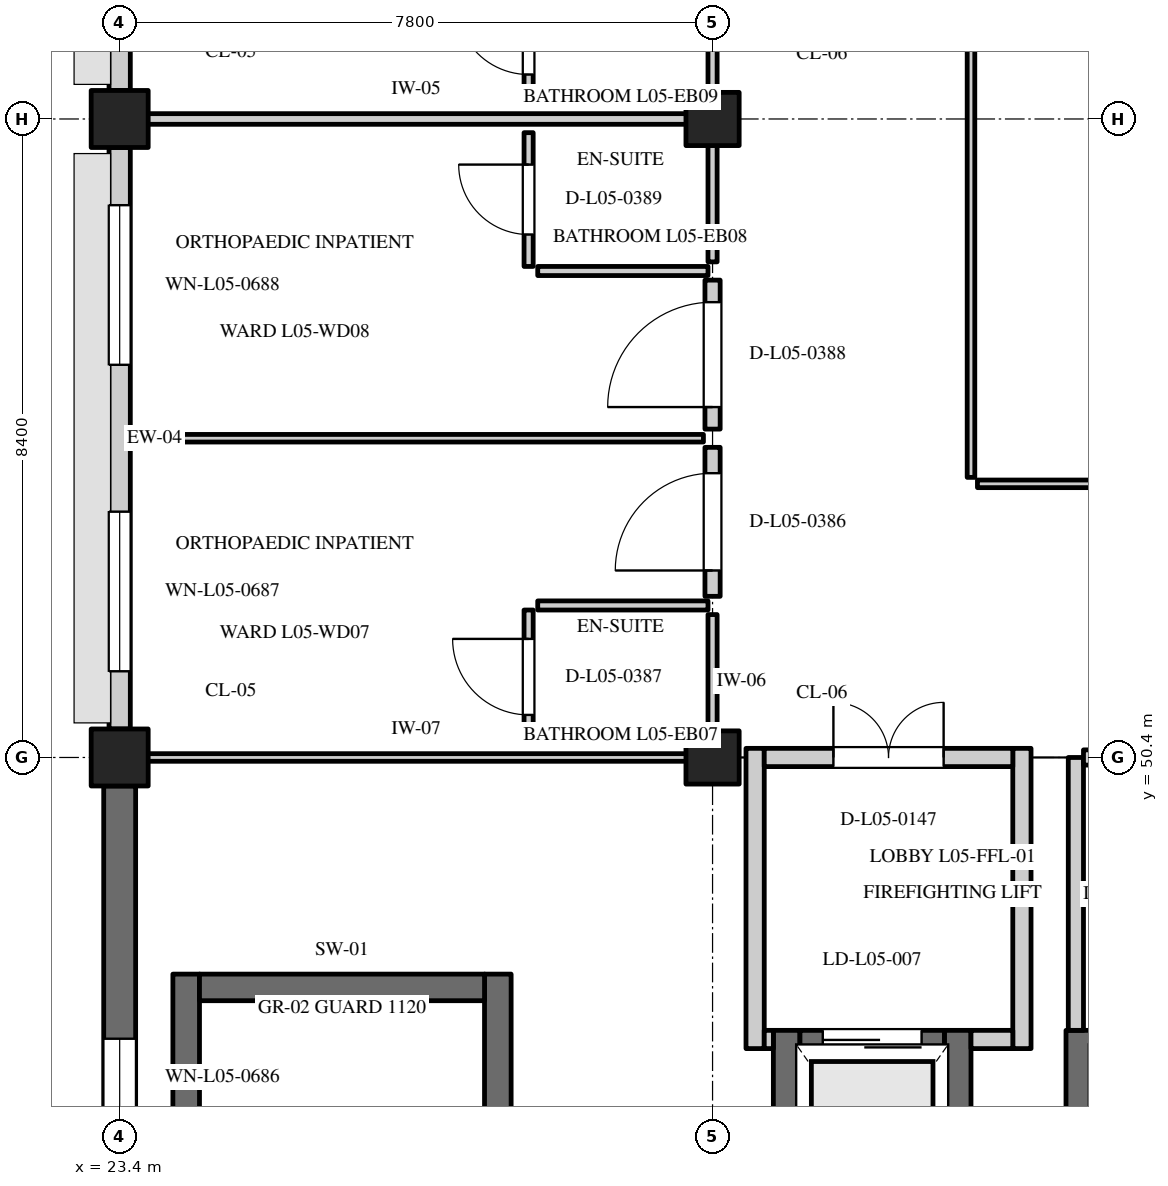
"""IFC4 building model, lengths in metres.
Left out: names, types, materials, properties, quantities, classifications, styles, units other than length and angle.
Written with IfcOpenShell. Run it as: python <this file> out.ifc"""

import sys

from ifc_helpers import new_model, si_unit, direction, frame, frame_2d, origin, origin_2d, place, context, subcontext, project, spatial, rectangle, extrude, element, fill, save


model = new_model("IFC4")
c1 = context("Model", 3, precision=1e-05, world=origin(), true_north=direction((0.0, 1.0)))
c2 = subcontext(c1, "Body", "Model", "MODEL_VIEW")
j1 = project(units=[si_unit("LENGTHUNIT", "METRE"), si_unit("PLANEANGLEUNIT", "RADIAN")], contexts=[c1])
p1 = place(None, origin())
s1 = spatial("IfcSite", under=j1, at=p1, CompositionType="ELEMENT")
p2 = place(p1, origin())
s2 = spatial("IfcBuilding", under=s1, at=p2, CompositionType="ELEMENT")
p3 = place(p2, frame((0.0, 0.0, 22.2)))
s3 = spatial("IfcBuildingStorey", under=s2, at=p3, CompositionType="ELEMENT", Elevation=22.2)
for number, where, z_axis, x_axis in (
    (1, (23.4, 50.4, 0.0), (0.0, 0.0, 1.0), (1.0, 0.0, 0.0)),
    (2, (23.4, 58.8, 0.0), (0.0, 0.0, 1.0), (1.0, 0.0, 0.0)),
):
    element("IfcColumn", number, at=place(p3, frame(where, z_axis=z_axis, x_axis=x_axis)), inside=s3, PredefinedType="COLUMN", context=c2, shape_type="SweptSolid", body=[
        extrude(rectangle(XDim=0.75, YDim=0.75, at=origin_2d()), origin(), (0.0, 0.0, 1.0), 3.9),
    ])
for number, where, z_axis, x_axis in (
    (3, (31.2, 50.4, 0.0), (0.0, 0.0, 1.0), (1.0, 0.0, 0.0)),
    (4, (31.2, 58.8, 0.0), (0.0, 0.0, 1.0), (1.0, 0.0, 0.0)),
):
    element("IfcColumn", number, at=place(p3, frame(where, z_axis=z_axis, x_axis=x_axis)), inside=s3, PredefinedType="COLUMN", context=c2, shape_type="SweptSolid", body=[
        extrude(rectangle(XDim=0.7, YDim=0.7, at=origin_2d()), origin(), (0.0, 0.0, 1.0), 3.9),
    ])
p4 = place(p3, frame((23.4, 42.375, 0.0), z_axis=(0.0, 0.0, 1.0), x_axis=(0.0, 1.0, 0.0)))
e5 = element("IfcWall", 5, at=p4, inside=s3, PredefinedType="SOLIDWALL", context=c2, shape_type="SweptSolid", body=[
    extrude(rectangle(XDim=7.65, YDim=0.42, at=frame_2d((3.825, 0.0))), origin(), (0.0, 0.0, 1.0), 2.95),
])
p5 = place(p4, frame((3.325, 0.0, 0.8)))
e6 = element("IfcOpeningElement", 6, at=p5, cuts=e5, PredefinedType="OPENING", context=c2, shape_type="SweptSolid", body=[
    extrude(rectangle(XDim=1.0, YDim=1.45, at=frame_2d((0.5, 0.725))), frame((0.0, 0.222, 0.0), z_axis=(0.0, -1.0, 0.0), x_axis=(1.0, 0.0, 0.0)), (0.0, 0.0, 1.0), 0.444),
])
p6 = place(p3, frame((23.4, 50.775, 0.0), z_axis=(0.0, 0.0, 1.0), x_axis=(0.0, 1.0, 0.0)))
e7 = element("IfcWall", 7, at=p6, inside=s3, PredefinedType="STANDARD", context=c2, shape_type="SweptSolid", body=[
    extrude(rectangle(XDim=7.65, YDim=0.28, at=frame_2d((3.825, 0.0))), origin(), (0.0, 0.0, 1.0), 2.95),
])
p7 = place(p6, frame((0.759, 0.0, 0.8)))
e8 = element("IfcOpeningElement", 8, at=p7, cuts=e7, PredefinedType="OPENING", context=c2, shape_type="SweptSolid", body=[
    extrude(rectangle(XDim=2.1, YDim=1.45, at=frame_2d((1.05, 0.725))), frame((0.0, 0.152, 0.0), z_axis=(0.0, -1.0, 0.0), x_axis=(1.0, 0.0, 0.0)), (0.0, 0.0, 1.0), 0.304),
])
p8 = place(p6, frame((4.791, 0.0, 0.8)))
e9 = element("IfcOpeningElement", 9, at=p8, cuts=e7, PredefinedType="OPENING", context=c2, shape_type="SweptSolid", body=[
    extrude(rectangle(XDim=2.1, YDim=1.45, at=frame_2d((1.05, 0.725))), frame((0.0, 0.152, 0.0), z_axis=(0.0, -1.0, 0.0), x_axis=(1.0, 0.0, 0.0)), (0.0, 0.0, 1.0), 0.304),
])
p9 = place(p3, frame((23.4, 59.175, 0.0), z_axis=(0.0, 0.0, 1.0), x_axis=(0.0, 1.0, 0.0)))
e10 = element("IfcWall", 10, at=p9, inside=s3, PredefinedType="STANDARD", context=c2, shape_type="SweptSolid", body=[
    extrude(rectangle(XDim=7.65, YDim=0.28, at=frame_2d((3.825, 0.0))), origin(), (0.0, 0.0, 1.0), 2.95),
])
p10 = place(p9, frame((0.809, 0.0, 0.8)))
e11 = element("IfcOpeningElement", 11, at=p10, cuts=e10, PredefinedType="OPENING", context=c2, shape_type="SweptSolid", body=[
    extrude(rectangle(XDim=2.0, YDim=1.75, at=frame_2d((1.0, 0.875))), frame((0.0, 0.152, 0.0), z_axis=(0.0, -1.0, 0.0), x_axis=(1.0, 0.0, 0.0)), (0.0, 0.0, 1.0), 0.304),
])
p11 = place(p9, frame((4.841, 0.0, 0.8)))
e12 = element("IfcOpeningElement", 12, at=p11, cuts=e10, PredefinedType="OPENING", context=c2, shape_type="SweptSolid", body=[
    extrude(rectangle(XDim=2.0, YDim=1.75, at=frame_2d((1.0, 0.875))), frame((0.0, 0.152, 0.0), z_axis=(0.0, -1.0, 0.0), x_axis=(1.0, 0.0, 0.0)), (0.0, 0.0, 1.0), 0.304),
])
for number, where, z_axis, x_axis in (
    (13, (24.275, 37.05, 0.0), (0.0, 0.0, 1.0), (0.0, 1.0, 0.0)),
    (14, (28.375, 37.05, 0.0), (0.0, 0.0, 1.0), (0.0, 1.0, 0.0)),
):
    element("IfcWall", number, at=place(p3, frame(where, z_axis=z_axis, x_axis=x_axis)), inside=s3, PredefinedType="SHEAR", context=c2, shape_type="SweptSolid", body=[
        extrude(rectangle(XDim=10.5, YDim=0.35, at=frame_2d((5.25, 0.0))), origin(), (0.0, 0.0, 1.0), 3.9),
    ])
for number, where, z_axis, x_axis in (
    (15, (24.45, 47.375, 0.0), (0.0, 0.0, 1.0), (1.0, 0.0, 0.0)),
    (16, (32.175, 43.06, 0.0), (0.0, 0.0, 1.0), (0.0, 1.0, 0.0)),
    (17, (34.425, 43.06, 0.0), (0.0, 0.0, 1.0), (0.0, 1.0, 0.0)),
):
    element("IfcWall", number, at=place(p3, frame(where, z_axis=z_axis, x_axis=x_axis)), inside=s3, PredefinedType="SHEAR", context=c2, shape_type="SweptSolid", body=[
        extrude(rectangle(XDim=3.75, YDim=0.35, at=frame_2d((1.875, 0.0))), origin(), (0.0, 0.0, 1.0), 3.9),
    ])
p12 = place(p3, frame((32.35, 46.635, 0.0), z_axis=(0.0, 0.0, 1.0), x_axis=(1.0, 0.0, 0.0)))
e18 = element("IfcWall", 18, at=p12, inside=s3, PredefinedType="SHEAR", context=c2, shape_type="SweptSolid", body=[
    extrude(rectangle(XDim=1.9, YDim=0.35, at=frame_2d((0.95, 0.0))), origin(), (0.0, 0.0, 1.0), 3.6),
])
p13 = place(p12, frame((0.3, 0.0, 0.0)))
e19 = element("IfcOpeningElement", 19, at=p13, cuts=e18, PredefinedType="OPENING", context=c2, shape_type="SweptSolid", body=[
    extrude(rectangle(XDim=1.3, YDim=2.2, at=frame_2d((0.65, 1.1))), frame((0.0, 0.187, 0.0), z_axis=(0.0, -1.0, 0.0), x_axis=(1.0, 0.0, 0.0)), (0.0, 0.0, 1.0), 0.374),
])
p14 = place(p3, frame((36.025, 43.36, 0.0), z_axis=(0.0, 0.0, 1.0), x_axis=(0.0, 1.0, 0.0)))
e20 = element("IfcWall", 20, at=p14, inside=s3, PredefinedType="SHEAR", context=c2, shape_type="SweptSolid", body=[
    extrude(rectangle(XDim=3.45, YDim=0.35, at=frame_2d((1.725, 0.0))), origin(), (0.0, 0.0, 1.0), 3.9),
])
for number, where, z_axis, x_axis in (
    (21, (31.76, 46.57, 0.0), (0.0, 0.0, 1.0), (0.0, 1.0, 0.0)),
    (22, (35.27, 46.57, 0.0), (0.0, 0.0, 1.0), (0.0, 1.0, 0.0)),
):
    element("IfcWall", number, at=place(p3, frame(where, z_axis=z_axis, x_axis=x_axis)), inside=s3, PredefinedType="STANDARD", context=c2, shape_type="SweptSolid", body=[
        extrude(rectangle(XDim=3.95, YDim=0.24, at=frame_2d((1.975, 0.0))), origin(), (0.0, 0.0, 1.0), 3.1),
    ])
p15 = place(p3, frame((31.88, 46.69, 0.0), z_axis=(0.0, 0.0, 1.0), x_axis=(1.0, 0.0, 0.0)))
e23 = element("IfcWall", 23, at=p15, inside=s3, PredefinedType="STANDARD", context=c2, shape_type="SweptSolid", body=[
    extrude(rectangle(XDim=0.12, YDim=0.24, at=frame_2d((0.06, 0.0))), origin(), (0.0, 0.0, 1.0), 3.1),
])
p16 = place(p3, frame((34.6, 46.69, 0.0), z_axis=(0.0, 0.0, 1.0), x_axis=(1.0, 0.0, 0.0)))
e24 = element("IfcWall", 24, at=p16, inside=s3, PredefinedType="STANDARD", context=c2, shape_type="SweptSolid", body=[
    extrude(rectangle(XDim=0.55, YDim=0.24, at=frame_2d((0.275, 0.0))), origin(), (0.0, 0.0, 1.0), 3.1),
])
p17 = place(p3, frame((31.88, 50.4, 0.0), z_axis=(0.0, 0.0, 1.0), x_axis=(1.0, 0.0, 0.0)))
e25 = element("IfcWall", 25, at=p17, inside=s3, PredefinedType="STANDARD", context=c2, shape_type="SweptSolid", body=[
    extrude(rectangle(XDim=3.27, YDim=0.24, at=frame_2d((1.635, 0.0))), origin(), (0.0, 0.0, 1.0), 3.1),
])
p18 = place(p17, frame((0.91, 0.0, 0.0)))
e26 = element("IfcOpeningElement", 26, at=p18, cuts=e25, PredefinedType="OPENING", context=c2, shape_type="SweptSolid", body=[
    extrude(rectangle(XDim=1.45, YDim=2.2, at=frame_2d((0.725, 1.1))), frame((0.0, 0.132, 0.0), z_axis=(0.0, -1.0, 0.0), x_axis=(1.0, 0.0, 0.0)), (0.0, 0.0, 1.0), 0.264),
])
p19 = place(p3, frame((35.98, 46.81, 0.0), z_axis=(0.0, 0.0, 1.0), x_axis=(0.0, 1.0, 0.0)))
e27 = element("IfcWall", 27, at=p19, inside=s3, PredefinedType="STANDARD", context=c2, shape_type="SweptSolid", body=[
    extrude(rectangle(XDim=3.59, YDim=0.2, at=frame_2d((1.795, 0.0))), origin(), (0.0, 0.0, 1.0), 3.1),
])
p20 = place(p3, frame((36.08, 50.4, 0.0), z_axis=(0.0, 0.0, 1.0), x_axis=(1.0, 0.0, 0.0)))
e28 = element("IfcWall", 28, at=p20, inside=s3, PredefinedType="STANDARD", context=c2, shape_type="SweptSolid", body=[
    extrude(rectangle(XDim=13.64, YDim=0.2, at=frame_2d((6.82, 0.0))), origin(), (0.0, 0.0, 1.0), 3.1),
])
p21 = place(p20, frame((5.995, 0.0, 0.0)))
e29 = element("IfcOpeningElement", 29, at=p21, cuts=e28, PredefinedType="OPENING", context=c2, shape_type="SweptSolid", body=[
    extrude(rectangle(XDim=1.65, YDim=2.25, at=frame_2d((0.825, 1.125))), frame((0.0, 0.112, 0.0), z_axis=(0.0, -1.0, 0.0), x_axis=(1.0, 0.0, 0.0)), (0.0, 0.0, 1.0), 0.224),
])
p22 = place(p3, frame((23.52, 50.4, 0.0), z_axis=(0.0, 0.0, 1.0), x_axis=(1.0, 0.0, 0.0)))
e30 = element("IfcWall", 30, at=p22, inside=s3, PredefinedType="PARTITIONING", context=c2, shape_type="SweptSolid", body=[
    extrude(rectangle(XDim=7.56, YDim=0.1, at=frame_2d((3.78, 0.0))), origin(), (0.0, 0.0, 1.0), 2.95),
])
p23 = place(p3, frame((23.52, 54.6, 0.0), z_axis=(0.0, 0.0, 1.0), x_axis=(1.0, 0.0, 0.0)))
e31 = element("IfcWall", 31, at=p23, inside=s3, PredefinedType="PARTITIONING", context=c2, shape_type="SweptSolid", body=[
    extrude(rectangle(XDim=7.56, YDim=0.1, at=frame_2d((3.78, 0.0))), origin(), (0.0, 0.0, 1.0), 3.58),
])
p24 = place(p3, frame((31.2, 52.52, 0.0), z_axis=(0.0, 0.0, 1.0), x_axis=(0.0, 1.0, 0.0)))
e32 = element("IfcWall", 32, at=p24, inside=s3, PredefinedType="STANDARD", context=c2, shape_type="SweptSolid", body=[
    extrude(rectangle(XDim=1.96, YDim=0.2, at=frame_2d((0.98, 0.0))), origin(), (0.0, 0.0, 1.0), 3.58),
])
p25 = place(p24, frame((0.34, 0.0, 0.0)))
e33 = element("IfcOpeningElement", 33, at=p25, cuts=e32, PredefinedType="OPENING", context=c2, shape_type="SweptSolid", body=[
    extrude(rectangle(XDim=1.28, YDim=2.15, at=frame_2d((0.64, 1.075))), frame((0.0, 0.112, 0.0), z_axis=(0.0, -1.0, 0.0), x_axis=(1.0, 0.0, 0.0)), (0.0, 0.0, 1.0), 0.224),
])
p26 = place(p3, frame((31.2, 50.52, 0.0), z_axis=(0.0, 0.0, 1.0), x_axis=(0.0, 1.0, 0.0)))
e34 = element("IfcWall", 34, at=p26, inside=s3, PredefinedType="PARTITIONING", context=c2, shape_type="SweptSolid", body=[
    extrude(rectangle(XDim=1.76, YDim=0.12, at=frame_2d((0.88, 0.0))), origin(), (0.0, 0.0, 1.0), 3.58),
])
p27 = place(p3, frame((28.9, 52.4, 0.0), z_axis=(0.0, 0.0, 1.0), x_axis=(1.0, 0.0, 0.0)))
e35 = element("IfcWall", 35, at=p27, inside=s3, PredefinedType="PARTITIONING", context=c2, shape_type="SweptSolid", body=[
    extrude(rectangle(XDim=2.24, YDim=0.12, at=frame_2d((1.12, 0.0))), origin(), (0.0, 0.0, 1.0), 3.58),
])
p28 = place(p3, frame((28.78, 50.58, 0.0), z_axis=(0.0, 0.0, 1.0), x_axis=(0.0, 1.0, 0.0)))
e36 = element("IfcWall", 36, at=p28, inside=s3, PredefinedType="PARTITIONING", context=c2, shape_type="SweptSolid", body=[
    extrude(rectangle(XDim=1.76, YDim=0.12, at=frame_2d((0.88, 0.0))), origin(), (0.0, 0.0, 1.0), 3.58),
])
p29 = place(p28, frame((0.38, 0.0, 0.0)))
e37 = element("IfcOpeningElement", 37, at=p29, cuts=e36, PredefinedType="OPENING", context=c2, shape_type="SweptSolid", body=[
    extrude(rectangle(XDim=1.0, YDim=2.1, at=frame_2d((0.5, 1.05))), frame((0.0, 0.072, 0.0), z_axis=(0.0, -1.0, 0.0), x_axis=(1.0, 0.0, 0.0)), (0.0, 0.0, 1.0), 0.144),
])
p30 = place(p3, frame((23.52, 58.8, 0.0), z_axis=(0.0, 0.0, 1.0), x_axis=(1.0, 0.0, 0.0)))
e38 = element("IfcWall", 38, at=p30, inside=s3, PredefinedType="PARTITIONING", context=c2, shape_type="SweptSolid", body=[
    extrude(rectangle(XDim=7.56, YDim=0.14, at=frame_2d((3.78, 0.0))), origin(), (0.0, 0.0, 1.0), 2.95),
])
p31 = place(p3, frame((31.2, 54.72, 0.0), z_axis=(0.0, 0.0, 1.0), x_axis=(0.0, 1.0, 0.0)))
e39 = element("IfcWall", 39, at=p31, inside=s3, PredefinedType="STANDARD", context=c2, shape_type="SweptSolid", body=[
    extrude(rectangle(XDim=1.96, YDim=0.2, at=frame_2d((0.98, 0.0))), origin(), (0.0, 0.0, 1.0), 3.58),
])
p32 = place(p31, frame((0.29, 0.0, 0.0)))
e40 = element("IfcOpeningElement", 40, at=p32, cuts=e39, PredefinedType="OPENING", context=c2, shape_type="SweptSolid", body=[
    extrude(rectangle(XDim=1.38, YDim=2.2, at=frame_2d((0.69, 1.1))), frame((0.0, 0.112, 0.0), z_axis=(0.0, -1.0, 0.0), x_axis=(1.0, 0.0, 0.0)), (0.0, 0.0, 1.0), 0.224),
])
p33 = place(p3, frame((31.2, 56.92, 0.0), z_axis=(0.0, 0.0, 1.0), x_axis=(0.0, 1.0, 0.0)))
e41 = element("IfcWall", 41, at=p33, inside=s3, PredefinedType="PARTITIONING", context=c2, shape_type="SweptSolid", body=[
    extrude(rectangle(XDim=1.76, YDim=0.12, at=frame_2d((0.88, 0.0))), origin(), (0.0, 0.0, 1.0), 3.58),
])
p34 = place(p3, frame((28.9, 56.8, 0.0), z_axis=(0.0, 0.0, 1.0), x_axis=(1.0, 0.0, 0.0)))
e42 = element("IfcWall", 42, at=p34, inside=s3, PredefinedType="PARTITIONING", context=c2, shape_type="SweptSolid", body=[
    extrude(rectangle(XDim=2.24, YDim=0.12, at=frame_2d((1.12, 0.0))), origin(), (0.0, 0.0, 1.0), 3.58),
])
p35 = place(p3, frame((28.78, 56.86, 0.0), z_axis=(0.0, 0.0, 1.0), x_axis=(0.0, 1.0, 0.0)))
e43 = element("IfcWall", 43, at=p35, inside=s3, PredefinedType="PARTITIONING", context=c2, shape_type="SweptSolid", body=[
    extrude(rectangle(XDim=1.76, YDim=0.12, at=frame_2d((0.88, 0.0))), origin(), (0.0, 0.0, 1.0), 3.58),
])
p36 = place(p35, frame((0.42, 0.0, 0.0)))
e44 = element("IfcOpeningElement", 44, at=p36, cuts=e43, PredefinedType="OPENING", context=c2, shape_type="SweptSolid", body=[
    extrude(rectangle(XDim=0.92, YDim=2.08, at=frame_2d((0.46, 1.04))), frame((0.0, 0.072, 0.0), z_axis=(0.0, -1.0, 0.0), x_axis=(1.0, 0.0, 0.0)), (0.0, 0.0, 1.0), 0.144),
])
p37 = place(p3, frame((31.2, 58.92, 0.0), z_axis=(0.0, 0.0, 1.0), x_axis=(0.0, 1.0, 0.0)))
e45 = element("IfcWall", 45, at=p37, inside=s3, PredefinedType="PARTITIONING", context=c2, shape_type="SweptSolid", body=[
    extrude(rectangle(XDim=1.76, YDim=0.12, at=frame_2d((0.88, 0.0))), origin(), (0.0, 0.0, 1.0), 3.58),
])
p38 = place(p3, frame((28.78, 58.98, 0.0), z_axis=(0.0, 0.0, 1.0), x_axis=(0.0, 1.0, 0.0)))
e46 = element("IfcWall", 46, at=p38, inside=s3, PredefinedType="PARTITIONING", context=c2, shape_type="SweptSolid", body=[
    extrude(rectangle(XDim=1.76, YDim=0.12, at=frame_2d((0.88, 0.0))), origin(), (0.0, 0.0, 1.0), 3.58),
])
p39 = place(p38, frame((0.405, 0.0, 0.0)))
e47 = element("IfcOpeningElement", 47, at=p39, cuts=e46, PredefinedType="OPENING", context=c2, shape_type="SweptSolid", body=[
    extrude(rectangle(XDim=0.95, YDim=2.1, at=frame_2d((0.475, 1.05))), frame((0.0, 0.072, 0.0), z_axis=(0.0, -1.0, 0.0), x_axis=(1.0, 0.0, 0.0)), (0.0, 0.0, 1.0), 0.144),
])
p40 = place(p3, frame((34.685, 54.0, 0.0), z_axis=(0.0, 0.0, 1.0), x_axis=(1.0, 0.0, 0.0)))
e48 = element("IfcWall", 48, at=p40, inside=s3, PredefinedType="PARTITIONING", context=c2, shape_type="SweptSolid", body=[
    extrude(rectangle(XDim=9.83, YDim=0.1, at=frame_2d((4.915, 0.0))), origin(), (0.0, 0.0, 1.0), 3.58),
])
p41 = place(p40, frame((2.267, 0.0, 0.0)))
e49 = element("IfcOpeningElement", 49, at=p41, cuts=e48, PredefinedType="OPENING", context=c2, shape_type="SweptSolid", body=[
    extrude(rectangle(XDim=1.6, YDim=2.25, at=frame_2d((0.8, 1.125))), frame((0.0, 0.062, 0.0), z_axis=(0.0, -1.0, 0.0), x_axis=(1.0, 0.0, 0.0)), (0.0, 0.0, 1.0), 0.124),
])
p42 = place(p3, frame((34.6, 54.085, 0.0), z_axis=(0.0, 0.0, 1.0), x_axis=(0.0, 1.0, 0.0)))
e50 = element("IfcWall", 50, at=p42, inside=s3, PredefinedType="PARTITIONING", context=c2, shape_type="SweptSolid", body=[
    extrude(rectangle(XDim=9.83, YDim=0.1, at=frame_2d((4.915, 0.0))), origin(), (0.0, 0.0, 1.0), 3.58),
])
p43 = place(p5, origin())
e51 = element("IfcWindow", 51, at=p43, inside=s3, PartitioningType="SINGLE_PANEL", PredefinedType="WINDOW", context=c2, shape_type="SweptSolid", body=[
    extrude(rectangle(XDim=1.0, YDim=1.45, at=frame_2d((0.5, 0.725))), frame((0.0, 0.03, 0.0), z_axis=(0.0, -1.0, 0.0), x_axis=(1.0, 0.0, 0.0)), (0.0, 0.0, 1.0), 0.06),
])
fill(e6, e51)
p44 = place(p7, origin())
e52 = element("IfcWindow", 52, at=p44, inside=s3, PartitioningType="DOUBLE_PANEL_VERTICAL", PredefinedType="WINDOW", context=c2, shape_type="SweptSolid", body=[
    extrude(rectangle(XDim=2.1, YDim=1.45, at=frame_2d((1.05, 0.725))), frame((0.0, 0.03, 0.0), z_axis=(0.0, -1.0, 0.0), x_axis=(1.0, 0.0, 0.0)), (0.0, 0.0, 1.0), 0.06),
])
fill(e8, e52)
p45 = place(p8, origin())
e53 = element("IfcWindow", 53, at=p45, inside=s3, PartitioningType="DOUBLE_PANEL_VERTICAL", PredefinedType="WINDOW", context=c2, shape_type="SweptSolid", body=[
    extrude(rectangle(XDim=2.1, YDim=1.45, at=frame_2d((1.05, 0.725))), frame((0.0, 0.03, 0.0), z_axis=(0.0, -1.0, 0.0), x_axis=(1.0, 0.0, 0.0)), (0.0, 0.0, 1.0), 0.06),
])
fill(e9, e53)
p46 = place(p13, origin())
e54 = element("IfcDoor", 54, at=p46, inside=s3, OperationType="SLIDING_TO_LEFT", PredefinedType="DOOR", context=c2, shape_type="SweptSolid", body=[
    extrude(rectangle(XDim=1.3, YDim=2.2, at=frame_2d((0.65, 1.1))), frame((0.0, 0.025, 0.0), z_axis=(0.0, -1.0, 0.0), x_axis=(1.0, 0.0, 0.0)), (0.0, 0.0, 1.0), 0.05),
])
fill(e19, e54)
p47 = place(p18, origin())
e55 = element("IfcDoor", 55, at=p47, inside=s3, OperationType="DOUBLE_DOOR_SINGLE_SWING", PredefinedType="DOOR", context=c2, shape_type="SweptSolid", body=[
    extrude(rectangle(XDim=1.45, YDim=2.2, at=frame_2d((0.725, 1.1))), frame((0.0, 0.025, 0.0), z_axis=(0.0, -1.0, 0.0), x_axis=(1.0, 0.0, 0.0)), (0.0, 0.0, 1.0), 0.05),
])
fill(e26, e55)
p48 = place(p25, origin())
e56 = element("IfcDoor", 56, at=p48, inside=s3, OperationType="SINGLE_SWING_LEFT", PredefinedType="DOOR", context=c2, shape_type="SweptSolid", body=[
    extrude(rectangle(XDim=1.28, YDim=2.15, at=frame_2d((0.64, 1.075))), frame((0.0, 0.025, 0.0), z_axis=(0.0, -1.0, 0.0), x_axis=(1.0, 0.0, 0.0)), (0.0, 0.0, 1.0), 0.05),
])
fill(e33, e56)
p49 = place(p29, frame((1.0, 0.0, 0.0), z_axis=(0.0, 0.0, 1.0), x_axis=(-1.0, 0.0, 0.0)))
e57 = element("IfcDoor", 57, at=p49, inside=s3, OperationType="SINGLE_SWING_LEFT", PredefinedType="DOOR", context=c2, shape_type="SweptSolid", body=[
    extrude(rectangle(XDim=1.0, YDim=2.1, at=frame_2d((0.5, 1.05))), frame((0.0, 0.025, 0.0), z_axis=(0.0, -1.0, 0.0), x_axis=(1.0, 0.0, 0.0)), (0.0, 0.0, 1.0), 0.05),
])
fill(e37, e57)
p50 = place(p32, origin())
e58 = element("IfcDoor", 58, at=p50, inside=s3, OperationType="SINGLE_SWING_LEFT", PredefinedType="DOOR", context=c2, shape_type="SweptSolid", body=[
    extrude(rectangle(XDim=1.38, YDim=2.2, at=frame_2d((0.69, 1.1))), frame((0.0, 0.025, 0.0), z_axis=(0.0, -1.0, 0.0), x_axis=(1.0, 0.0, 0.0)), (0.0, 0.0, 1.0), 0.05),
])
fill(e40, e58)
p51 = place(p36, frame((0.92, 0.0, 0.0), z_axis=(0.0, 0.0, 1.0), x_axis=(-1.0, 0.0, 0.0)))
e59 = element("IfcDoor", 59, at=p51, inside=s3, OperationType="SINGLE_SWING_LEFT", PredefinedType="DOOR", context=c2, shape_type="SweptSolid", body=[
    extrude(rectangle(XDim=0.92, YDim=2.08, at=frame_2d((0.46, 1.04))), frame((0.0, 0.025, 0.0), z_axis=(0.0, -1.0, 0.0), x_axis=(1.0, 0.0, 0.0)), (0.0, 0.0, 1.0), 0.05),
])
fill(e44, e59)
p52 = place(p39, frame((0.95, 0.0, 0.0), z_axis=(0.0, 0.0, 1.0), x_axis=(-1.0, 0.0, 0.0)))
e60 = element("IfcDoor", 60, at=p52, inside=s3, OperationType="SINGLE_SWING_LEFT", PredefinedType="DOOR", context=c2, shape_type="SweptSolid", body=[
    extrude(rectangle(XDim=0.95, YDim=2.1, at=frame_2d((0.475, 1.05))), frame((0.0, 0.025, 0.0), z_axis=(0.0, -1.0, 0.0), x_axis=(1.0, 0.0, 0.0)), (0.0, 0.0, 1.0), 0.05),
])
fill(e47, e60)
save(model, sys.argv[1])
